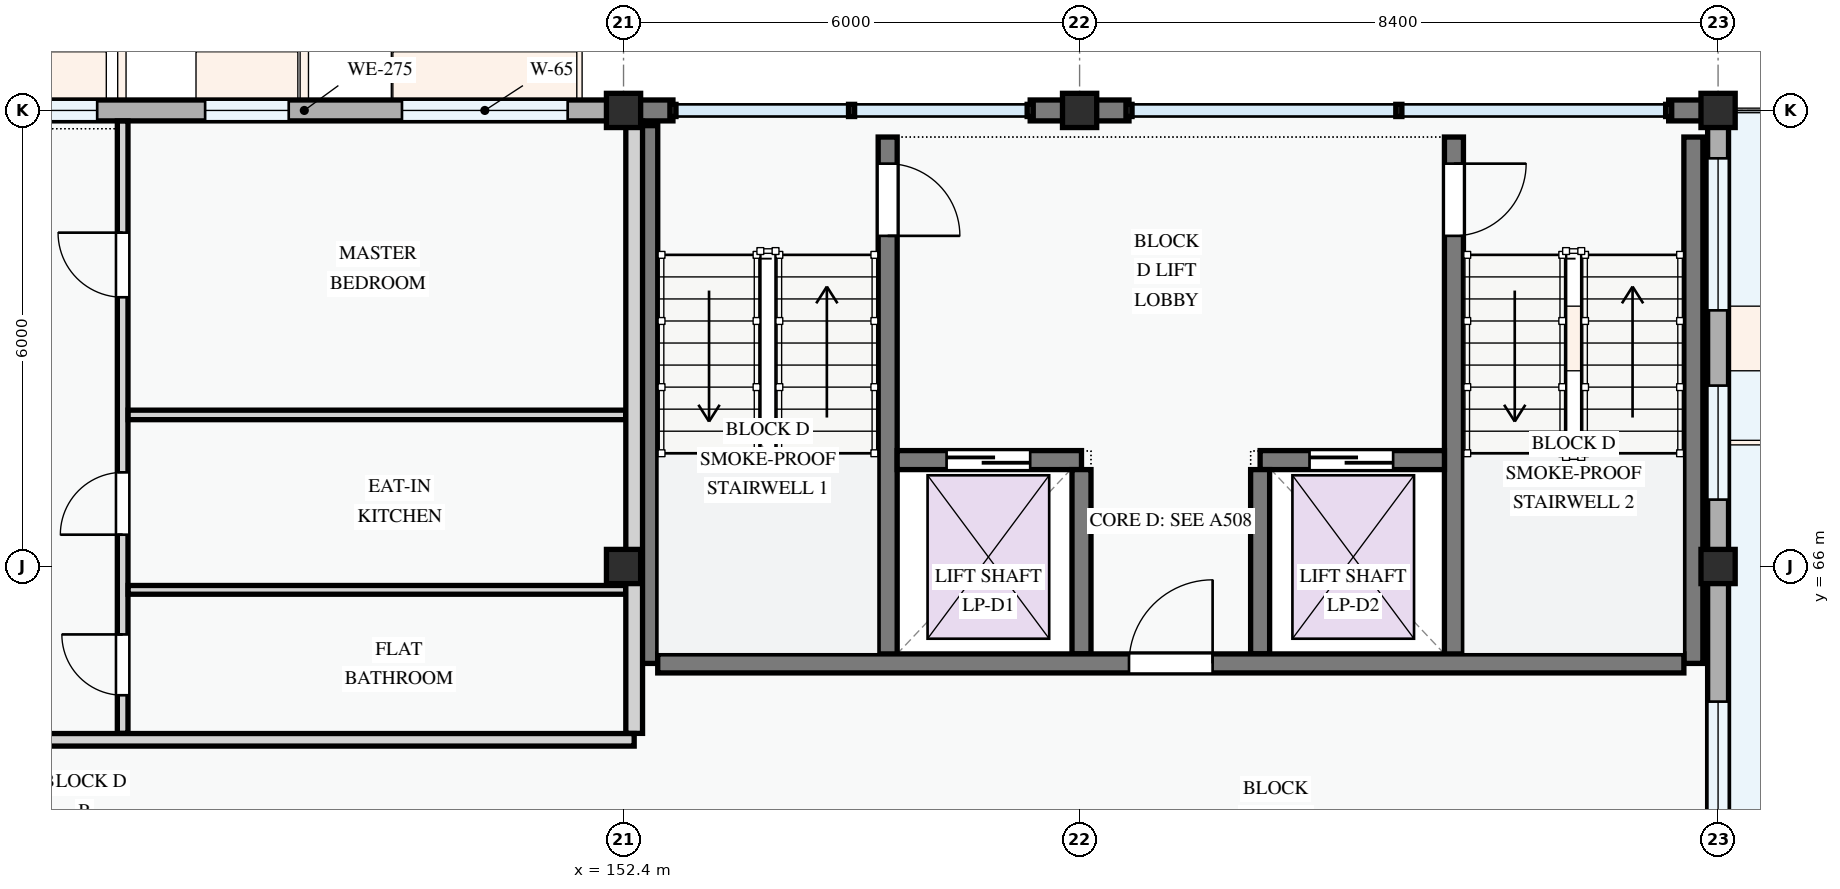
"""IFC4 building model, lengths in metres.
Left out: names, types, materials, properties, quantities, classifications, styles, units other than length and angle.
Written with IfcOpenShell. Run it as: python <this file> out.ifc"""

import sys

from ifc_helpers import new_model, si_unit, direction, frame, frame_2d, origin, origin_2d, place, context, subcontext, project, spatial, rectangle, extrude, element, fill, save


model = new_model("IFC4")
c1 = context("Model", 3, precision=1e-05, world=origin(), true_north=direction((0.0, 1.0)))
c2 = subcontext(c1, "Body", "Model", "MODEL_VIEW")
j1 = project(units=[si_unit("LENGTHUNIT", "METRE"), si_unit("PLANEANGLEUNIT", "RADIAN")], contexts=[c1])
p1 = place(None, origin())
s1 = spatial("IfcSite", under=j1, at=p1, CompositionType="ELEMENT")
p2 = place(p1, origin())
s2 = spatial("IfcBuilding", under=s1, at=p2, CompositionType="ELEMENT")
p3 = place(p2, frame((0.0, 0.0, 21.3)))
s3 = spatial("IfcBuildingStorey", under=s2, at=p3, CompositionType="ELEMENT", Elevation=21.3)
for number, where, z_axis, x_axis in (
    (1, (152.4, 66.0, 0.0), (0.0, 0.0, 1.0), (1.0, 0.0, 0.0)),
    (2, (152.4, 72.0, 0.0), (0.0, 0.0, 1.0), (1.0, 0.0, 0.0)),
    (3, (158.4, 72.0, 0.0), (0.0, 0.0, 1.0), (1.0, 0.0, 0.0)),
    (4, (166.8, 66.0, 0.0), (0.0, 0.0, 1.0), (1.0, 0.0, 0.0)),
    (5, (166.8, 72.0, 0.0), (0.0, 0.0, 1.0), (1.0, 0.0, 0.0)),
):
    element("IfcColumn", number, at=place(p3, frame(where, z_axis=z_axis, x_axis=x_axis)), inside=s3, PredefinedType="COLUMN", context=c2, shape_type="SweptSolid", body=[
        extrude(rectangle(XDim=0.45, YDim=0.45, at=origin_2d()), origin(), (0.0, 0.0, 1.0), 3.3),
    ])
p4 = place(p3, frame((152.4, 72.0, 0.0), z_axis=(0.0, 0.0, 1.0), x_axis=(-1.0, 0.0, 0.0)))
e6 = element("IfcWall", 6, at=p4, inside=s3, PredefinedType="STANDARD", context=c2, shape_type="SweptSolid", body=[
    extrude(rectangle(XDim=8.4, YDim=0.275, at=frame_2d((4.2, 0.0))), origin(), (0.0, 0.0, 1.0), 2.375),
])
p5 = place(p4, frame((0.735, 0.0, 0.78)))
e7 = element("IfcOpeningElement", 7, at=p5, cuts=e6, PredefinedType="OPENING", context=c2, shape_type="SweptSolid", body=[
    extrude(rectangle(XDim=2.18, YDim=1.48, at=frame_2d((1.09, 0.74))), frame((0.0, 0.147, 0.0), z_axis=(0.0, -1.0, 0.0), x_axis=(1.0, 0.0, 0.0)), (0.0, 0.0, 1.0), 0.295),
])
p6 = place(p4, frame((4.405, 0.0, 0.78)))
e8 = element("IfcOpeningElement", 8, at=p6, cuts=e6, PredefinedType="OPENING", context=c2, shape_type="SweptSolid", body=[
    extrude(rectangle(XDim=1.1, YDim=1.3, at=frame_2d((0.55, 0.65))), frame((0.0, 0.147, 0.0), z_axis=(0.0, -1.0, 0.0), x_axis=(1.0, 0.0, 0.0)), (0.0, 0.0, 1.0), 0.295),
])
p7 = place(p4, frame((6.925, 0.0, 0.78)))
e9 = element("IfcOpeningElement", 9, at=p7, cuts=e6, PredefinedType="OPENING", context=c2, shape_type="SweptSolid", body=[
    extrude(rectangle(XDim=0.95, YDim=1.15, at=frame_2d((0.475, 0.575))), frame((0.0, 0.147, 0.0), z_axis=(0.0, -1.0, 0.0), x_axis=(1.0, 0.0, 0.0)), (0.0, 0.0, 1.0), 0.295),
])
p8 = place(p3, frame((166.8, 57.6, 0.0), z_axis=(0.0, 0.0, 1.0), x_axis=(0.0, 1.0, 0.0)))
e10 = element("IfcWall", 10, at=p8, inside=s3, PredefinedType="STANDARD", context=c2, shape_type="SweptSolid", body=[
    extrude(rectangle(XDim=8.4, YDim=0.275, at=frame_2d((4.2, 0.0))), origin(), (0.0, 0.0, 1.0), 2.345),
])
p9 = place(p8, frame((1.485, 0.0, 0.78)))
e11 = element("IfcOpeningElement", 11, at=p9, cuts=e10, PredefinedType="OPENING", context=c2, shape_type="SweptSolid", body=[
    extrude(rectangle(XDim=1.42, YDim=1.38, at=frame_2d((0.71, 0.69))), frame((0.0, 0.147, 0.0), z_axis=(0.0, -1.0, 0.0), x_axis=(1.0, 0.0, 0.0)), (0.0, 0.0, 1.0), 0.295),
])
p10 = place(p8, frame((4.702, 0.0, 0.78)))
e12 = element("IfcOpeningElement", 12, at=p10, cuts=e10, PredefinedType="OPENING", context=c2, shape_type="SweptSolid", body=[
    extrude(rectangle(XDim=1.92, YDim=1.44, at=frame_2d((0.96, 0.72))), frame((0.0, 0.147, 0.0), z_axis=(0.0, -1.0, 0.0), x_axis=(1.0, 0.0, 0.0)), (0.0, 0.0, 1.0), 0.295),
])
p11 = place(p3, frame((166.8, 66.0, 0.0), z_axis=(0.0, 0.0, 1.0), x_axis=(0.0, 1.0, 0.0)))
e13 = element("IfcWall", 13, at=p11, inside=s3, PredefinedType="STANDARD", context=c2, shape_type="SweptSolid", body=[
    extrude(rectangle(XDim=6.0, YDim=0.275, at=frame_2d((3.0, 0.0))), origin(), (0.0, 0.0, 1.0), 2.445),
])
p12 = place(p11, frame((0.88, 0.0, 0.78)))
e14 = element("IfcOpeningElement", 14, at=p12, cuts=e13, PredefinedType="OPENING", context=c2, shape_type="SweptSolid", body=[
    extrude(rectangle(XDim=1.5, YDim=1.5, at=frame_2d((0.75, 0.75))), frame((0.0, 0.147, 0.0), z_axis=(0.0, -1.0, 0.0), x_axis=(1.0, 0.0, 0.0)), (0.0, 0.0, 1.0), 0.295),
])
p13 = place(p11, frame((3.37, 0.0, 0.78)))
e15 = element("IfcOpeningElement", 15, at=p13, cuts=e13, PredefinedType="OPENING", context=c2, shape_type="SweptSolid", body=[
    extrude(rectangle(XDim=2.0, YDim=1.5, at=frame_2d((1.0, 0.75))), frame((0.0, 0.147, 0.0), z_axis=(0.0, -1.0, 0.0), x_axis=(1.0, 0.0, 0.0)), (0.0, 0.0, 1.0), 0.295),
])
p14 = place(p3, frame((166.66, 72.0, 0.0), z_axis=(0.0, 0.0, 1.0), x_axis=(-1.0, 0.0, 0.0)))
e16 = element("IfcWall", 16, at=p14, inside=s3, PredefinedType="STANDARD", context=c2, shape_type="SweptSolid", body=[
    extrude(rectangle(XDim=0.51, YDim=0.275, at=frame_2d((0.255, 0.0))), origin(), (0.0, 0.0, 1.0), 3.04),
])
p15 = place(p3, frame((159.05, 72.0, 0.0), z_axis=(0.0, 0.0, 1.0), x_axis=(-1.0, 0.0, 0.0)))
e17 = element("IfcWall", 17, at=p15, inside=s3, PredefinedType="STANDARD", context=c2, shape_type="SweptSolid", body=[
    extrude(rectangle(XDim=0.65, YDim=0.275, at=frame_2d((0.325, 0.0))), origin(), (0.0, 0.0, 1.0), 3.04),
])
p16 = place(p3, frame((158.4, 72.0, 0.0), z_axis=(0.0, 0.0, 1.0), x_axis=(-1.0, 0.0, 0.0)))
e18 = element("IfcWall", 18, at=p16, inside=s3, PredefinedType="STANDARD", context=c2, shape_type="SweptSolid", body=[
    extrude(rectangle(XDim=0.65, YDim=0.275, at=frame_2d((0.325, 0.0))), origin(), (0.0, 0.0, 1.0), 3.04),
])
p17 = place(p3, frame((153.05, 72.0, 0.0), z_axis=(0.0, 0.0, 1.0), x_axis=(-1.0, 0.0, 0.0)))
e19 = element("IfcWall", 19, at=p17, inside=s3, PredefinedType="STANDARD", context=c2, shape_type="SweptSolid", body=[
    extrude(rectangle(XDim=0.65, YDim=0.275, at=frame_2d((0.325, 0.0))), origin(), (0.0, 0.0, 1.0), 3.04),
])
p18 = place(p3, frame((155.875, 71.65, 0.0), z_axis=(0.0, 0.0, 1.0), x_axis=(0.0, -1.0, 0.0)))
e20 = element("IfcWall", 20, at=p18, inside=s3, PredefinedType="SHEAR", context=c2, shape_type="SweptSolid", body=[
    extrude(rectangle(XDim=6.925, YDim=0.25, at=frame_2d((3.462, 0.0))), origin(), (0.0, 0.0, 1.0), 3.0),
])
p19 = place(p18, frame((0.35, 0.0, 0.0)))
e21 = element("IfcOpeningElement", 21, at=p19, cuts=e20, PredefinedType="OPENING", context=c2, shape_type="SweptSolid", body=[
    extrude(rectangle(XDim=0.95, YDim=2.1, at=frame_2d((0.475, 1.05))), frame((0.0, 0.135, 0.0), z_axis=(0.0, -1.0, 0.0), x_axis=(1.0, 0.0, 0.0)), (0.0, 0.0, 1.0), 0.27),
])
p20 = place(p3, frame((152.725, 71.8, 0.0), z_axis=(0.0, 0.0, 1.0), x_axis=(0.0, -1.0, 0.0)))
e22 = element("IfcWall", 22, at=p20, inside=s3, PredefinedType="SHEAR", context=c2, shape_type="SweptSolid", body=[
    extrude(rectangle(XDim=7.075, YDim=0.25, at=frame_2d((3.538, 0.0))), origin(), (0.0, 0.0, 1.0), 3.0),
])
p21 = place(p3, frame((166.475, 71.65, 0.0), z_axis=(0.0, 0.0, 1.0), x_axis=(0.0, -1.0, 0.0)))
e23 = element("IfcWall", 23, at=p21, inside=s3, PredefinedType="SHEAR", context=c2, shape_type="SweptSolid", body=[
    extrude(rectangle(XDim=6.925, YDim=0.25, at=frame_2d((3.462, 0.0))), origin(), (0.0, 0.0, 1.0), 3.0),
])
p22 = place(p3, frame((163.325, 71.65, 0.0), z_axis=(0.0, 0.0, 1.0), x_axis=(0.0, -1.0, 0.0)))
e24 = element("IfcWall", 24, at=p22, inside=s3, PredefinedType="SHEAR", context=c2, shape_type="SweptSolid", body=[
    extrude(rectangle(XDim=6.925, YDim=0.25, at=frame_2d((3.462, 0.0))), origin(), (0.0, 0.0, 1.0), 3.0),
])
p23 = place(p22, frame((0.35, 0.0, 0.0)))
e25 = element("IfcOpeningElement", 25, at=p23, cuts=e24, PredefinedType="OPENING", context=c2, shape_type="SweptSolid", body=[
    extrude(rectangle(XDim=0.95, YDim=2.1, at=frame_2d((0.475, 1.05))), frame((0.0, 0.135, 0.0), z_axis=(0.0, -1.0, 0.0), x_axis=(1.0, 0.0, 0.0)), (0.0, 0.0, 1.0), 0.27),
])
p24 = place(p3, frame((156.0, 67.4, 0.0), z_axis=(0.0, 0.0, 1.0), x_axis=(1.0, 0.0, 0.0)))
e26 = element("IfcWall", 26, at=p24, inside=s3, PredefinedType="SHEAR", context=c2, shape_type="SweptSolid", body=[
    extrude(rectangle(XDim=2.425, YDim=0.25, at=frame_2d((1.212, 0.0))), origin(), (0.0, 0.0, 1.0), 3.0),
])
p25 = place(p24, frame((0.65, 0.0, 0.0)))
e27 = element("IfcOpeningElement", 27, at=p25, cuts=e26, PredefinedType="OPENING", context=c2, shape_type="SweptSolid", body=[
    extrude(rectangle(XDim=1.1, YDim=2.15, at=frame_2d((0.55, 1.075))), frame((0.0, 0.135, 0.0), z_axis=(0.0, -1.0, 0.0), x_axis=(1.0, 0.0, 0.0)), (0.0, 0.0, 1.0), 0.27),
])
p26 = place(p3, frame((160.775, 67.4, 0.0), z_axis=(0.0, 0.0, 1.0), x_axis=(1.0, 0.0, 0.0)))
e28 = element("IfcWall", 28, at=p26, inside=s3, PredefinedType="SHEAR", context=c2, shape_type="SweptSolid", body=[
    extrude(rectangle(XDim=2.425, YDim=0.25, at=frame_2d((1.212, 0.0))), origin(), (0.0, 0.0, 1.0), 3.0),
])
p27 = place(p26, frame((0.65, 0.0, 0.0)))
e29 = element("IfcOpeningElement", 29, at=p27, cuts=e28, PredefinedType="OPENING", context=c2, shape_type="SweptSolid", body=[
    extrude(rectangle(XDim=1.1, YDim=2.15, at=frame_2d((0.55, 1.075))), frame((0.0, 0.135, 0.0), z_axis=(0.0, -1.0, 0.0), x_axis=(1.0, 0.0, 0.0)), (0.0, 0.0, 1.0), 0.27),
])
for number, where, z_axis, x_axis in (
    (30, (158.425, 67.275, 0.0), (0.0, 0.0, 1.0), (0.0, -1.0, 0.0)),
    (31, (160.775, 67.275, 0.0), (0.0, 0.0, 1.0), (0.0, -1.0, 0.0)),
):
    element("IfcWall", number, at=place(p3, frame(where, z_axis=z_axis, x_axis=x_axis)), inside=s3, PredefinedType="SHEAR", context=c2, shape_type="SweptSolid", body=[
        extrude(rectangle(XDim=2.425, YDim=0.25, at=frame_2d((1.212, 0.0))), origin(), (0.0, 0.0, 1.0), 3.0),
    ])
p28 = place(p3, frame((152.85, 64.725, 0.0), z_axis=(0.0, 0.0, 1.0), x_axis=(1.0, 0.0, 0.0)))
e32 = element("IfcWall", 32, at=p28, inside=s3, PredefinedType="SHEAR", context=c2, shape_type="SweptSolid", body=[
    extrude(rectangle(XDim=13.5, YDim=0.25, at=frame_2d((6.75, 0.0))), origin(), (0.0, 0.0, 1.0), 3.0),
])
p29 = place(p28, frame((6.2, 0.0, 0.0)))
e33 = element("IfcOpeningElement", 33, at=p29, cuts=e32, PredefinedType="OPENING", context=c2, shape_type="SweptSolid", body=[
    extrude(rectangle(XDim=1.1, YDim=2.15, at=frame_2d((0.55, 1.075))), frame((0.0, 0.135, 0.0), z_axis=(0.0, -1.0, 0.0), x_axis=(1.0, 0.0, 0.0)), (0.0, 0.0, 1.0), 0.27),
])
p30 = place(p3, frame((145.81, 63.804, 0.0), z_axis=(0.0, 0.0, 1.0), x_axis=(0.0, 1.0, 0.0)))
e34 = element("IfcWall", 34, at=p30, inside=s3, PredefinedType="PARTITIONING", context=c2, shape_type="SweptSolid", body=[
    extrude(rectangle(XDim=8.056, YDim=0.14, at=frame_2d((4.028, 0.0))), origin(), (0.0, 0.0, 1.0), 3.0),
])
p31 = place(p30, frame((0.502, 0.0, 0.0)))
e35 = element("IfcOpeningElement", 35, at=p31, cuts=e34, PredefinedType="OPENING", context=c2, shape_type="SweptSolid", body=[
    extrude(rectangle(XDim=0.8, YDim=2.1, at=frame_2d((0.4, 1.05))), frame((0.0, 0.08, 0.0), z_axis=(0.0, -1.0, 0.0), x_axis=(1.0, 0.0, 0.0)), (0.0, 0.0, 1.0), 0.16),
])
p32 = place(p30, frame((2.614, 0.0, 0.0)))
e36 = element("IfcOpeningElement", 36, at=p32, cuts=e34, PredefinedType="OPENING", context=c2, shape_type="SweptSolid", body=[
    extrude(rectangle(XDim=0.82, YDim=2.08, at=frame_2d((0.41, 1.04))), frame((0.0, 0.08, 0.0), z_axis=(0.0, -1.0, 0.0), x_axis=(1.0, 0.0, 0.0)), (0.0, 0.0, 1.0), 0.16),
])
p33 = place(p30, frame((5.738, 0.0, 0.0)))
e37 = element("IfcOpeningElement", 37, at=p33, cuts=e34, PredefinedType="OPENING", context=c2, shape_type="SweptSolid", body=[
    extrude(rectangle(XDim=0.85, YDim=2.1, at=frame_2d((0.425, 1.05))), frame((0.0, 0.08, 0.0), z_axis=(0.0, -1.0, 0.0), x_axis=(1.0, 0.0, 0.0)), (0.0, 0.0, 1.0), 0.16),
])
p34 = place(p3, frame((145.882, 67.994, 0.0), z_axis=(0.0, 0.0, 1.0), x_axis=(1.0, 0.0, 0.0)))
e38 = element("IfcWall", 38, at=p34, inside=s3, PredefinedType="PARTITIONING", context=c2, shape_type="SweptSolid", body=[
    extrude(rectangle(XDim=6.546, YDim=0.125, at=frame_2d((3.273, 0.0))), origin(), (0.0, 0.0, 1.0), 3.0),
])
p35 = place(p3, frame((145.882, 65.693, 0.0), z_axis=(0.0, 0.0, 1.0), x_axis=(1.0, 0.0, 0.0)))
e39 = element("IfcWall", 39, at=p35, inside=s3, PredefinedType="PARTITIONING", context=c2, shape_type="SweptSolid", body=[
    extrude(rectangle(XDim=6.546, YDim=0.115, at=frame_2d((3.273, 0.0))), origin(), (0.0, 0.0, 1.0), 2.375),
])
p36 = place(p3, frame((152.54, 63.804, 0.0), z_axis=(0.0, 0.0, 1.0), x_axis=(0.0, 1.0, 0.0)))
e40 = element("IfcWall", 40, at=p36, inside=s3, PredefinedType="PARTITIONING", context=c2, shape_type="SweptSolid", body=[
    extrude(rectangle(XDim=8.056, YDim=0.22, at=frame_2d((4.028, 0.0))), origin(), (0.0, 0.0, 1.0), 2.425),
])
p37 = place(p3, frame((138.139, 63.72, 0.0), z_axis=(0.0, 0.0, 1.0), x_axis=(1.0, 0.0, 0.0)))
e41 = element("IfcWall", 41, at=p37, inside=s3, PredefinedType="PARTITIONING", context=c2, shape_type="SweptSolid", body=[
    extrude(rectangle(XDim=14.401, YDim=0.165, at=frame_2d((7.2, 0.0))), origin(), (0.0, 0.0, 1.0), 3.0),
])
p38 = place(p37, frame((2.333, 0.0, 0.0)))
e42 = element("IfcOpeningElement", 42, at=p38, cuts=e41, PredefinedType="OPENING", context=c2, shape_type="SweptSolid", body=[
    extrude(rectangle(XDim=0.92, YDim=2.1, at=frame_2d((0.46, 1.05))), frame((0.0, 0.093, 0.0), z_axis=(0.0, -1.0, 0.0), x_axis=(1.0, 0.0, 0.0)), (0.0, 0.0, 1.0), 0.185),
])
p39 = place(p5, origin())
e43 = element("IfcWindow", 43, at=p39, inside=s3, PartitioningType="DOUBLE_PANEL_VERTICAL", PredefinedType="WINDOW", context=c2, shape_type="SweptSolid", body=[
    extrude(rectangle(XDim=2.18, YDim=1.48, at=frame_2d((1.09, 0.74))), frame((0.0, 0.03, 0.0), z_axis=(0.0, -1.0, 0.0), x_axis=(1.0, 0.0, 0.0)), (0.0, 0.0, 1.0), 0.06),
])
fill(e7, e43)
p40 = place(p6, origin())
e44 = element("IfcWindow", 44, at=p40, inside=s3, PartitioningType="SINGLE_PANEL", PredefinedType="WINDOW", context=c2, shape_type="SweptSolid", body=[
    extrude(rectangle(XDim=1.1, YDim=1.3, at=frame_2d((0.55, 0.65))), frame((0.0, 0.03, 0.0), z_axis=(0.0, -1.0, 0.0), x_axis=(1.0, 0.0, 0.0)), (0.0, 0.0, 1.0), 0.06),
])
fill(e8, e44)
p41 = place(p7, origin())
e45 = element("IfcWindow", 45, at=p41, inside=s3, PartitioningType="SINGLE_PANEL", PredefinedType="WINDOW", context=c2, shape_type="SweptSolid", body=[
    extrude(rectangle(XDim=0.95, YDim=1.15, at=frame_2d((0.475, 0.575))), frame((0.0, 0.03, 0.0), z_axis=(0.0, -1.0, 0.0), x_axis=(1.0, 0.0, 0.0)), (0.0, 0.0, 1.0), 0.06),
])
fill(e9, e45)
p42 = place(p10, origin())
e46 = element("IfcWindow", 46, at=p42, inside=s3, PartitioningType="DOUBLE_PANEL_VERTICAL", PredefinedType="WINDOW", context=c2, shape_type="SweptSolid", body=[
    extrude(rectangle(XDim=1.92, YDim=1.44, at=frame_2d((0.96, 0.72))), frame((0.0, 0.03, 0.0), z_axis=(0.0, -1.0, 0.0), x_axis=(1.0, 0.0, 0.0)), (0.0, 0.0, 1.0), 0.06),
])
fill(e12, e46)
p43 = place(p12, origin())
e47 = element("IfcWindow", 47, at=p43, inside=s3, PartitioningType="SINGLE_PANEL", PredefinedType="WINDOW", context=c2, shape_type="SweptSolid", body=[
    extrude(rectangle(XDim=1.5, YDim=1.5, at=frame_2d((0.75, 0.75))), frame((0.0, 0.03, 0.0), z_axis=(0.0, -1.0, 0.0), x_axis=(1.0, 0.0, 0.0)), (0.0, 0.0, 1.0), 0.06),
])
fill(e14, e47)
p44 = place(p13, origin())
e48 = element("IfcWindow", 48, at=p44, inside=s3, PartitioningType="DOUBLE_PANEL_VERTICAL", PredefinedType="WINDOW", context=c2, shape_type="SweptSolid", body=[
    extrude(rectangle(XDim=2.0, YDim=1.5, at=frame_2d((1.0, 0.75))), frame((0.0, 0.03, 0.0), z_axis=(0.0, -1.0, 0.0), x_axis=(1.0, 0.0, 0.0)), (0.0, 0.0, 1.0), 0.06),
])
fill(e15, e48)
p45 = place(p19, origin())
e49 = element("IfcDoor", 49, at=p45, inside=s3, OperationType="SINGLE_SWING_RIGHT", PredefinedType="DOOR", context=c2, shape_type="SweptSolid", body=[
    extrude(rectangle(XDim=0.95, YDim=2.1, at=frame_2d((0.475, 1.05))), frame((0.0, 0.025, 0.0), z_axis=(0.0, -1.0, 0.0), x_axis=(1.0, 0.0, 0.0)), (0.0, 0.0, 1.0), 0.05),
])
fill(e21, e49)
p46 = place(p23, origin())
e50 = element("IfcDoor", 50, at=p46, inside=s3, OperationType="SINGLE_SWING_LEFT", PredefinedType="DOOR", context=c2, shape_type="SweptSolid", body=[
    extrude(rectangle(XDim=0.95, YDim=2.1, at=frame_2d((0.475, 1.05))), frame((0.0, 0.025, 0.0), z_axis=(0.0, -1.0, 0.0), x_axis=(1.0, 0.0, 0.0)), (0.0, 0.0, 1.0), 0.05),
])
fill(e25, e50)
p47 = place(p25, origin())
e51 = element("IfcDoor", 51, at=p47, inside=s3, OperationType="SLIDING_TO_LEFT", PredefinedType="DOOR", context=c2, shape_type="SweptSolid", body=[
    extrude(rectangle(XDim=1.1, YDim=2.15, at=frame_2d((0.55, 1.075))), frame((0.0, 0.025, 0.0), z_axis=(0.0, -1.0, 0.0), x_axis=(1.0, 0.0, 0.0)), (0.0, 0.0, 1.0), 0.05),
])
fill(e27, e51)
p48 = place(p27, origin())
e52 = element("IfcDoor", 52, at=p48, inside=s3, OperationType="SLIDING_TO_LEFT", PredefinedType="DOOR", context=c2, shape_type="SweptSolid", body=[
    extrude(rectangle(XDim=1.1, YDim=2.15, at=frame_2d((0.55, 1.075))), frame((0.0, 0.025, 0.0), z_axis=(0.0, -1.0, 0.0), x_axis=(1.0, 0.0, 0.0)), (0.0, 0.0, 1.0), 0.05),
])
fill(e29, e52)
p49 = place(p29, origin())
e53 = element("IfcDoor", 53, at=p49, inside=s3, OperationType="SINGLE_SWING_RIGHT", PredefinedType="DOOR", context=c2, shape_type="SweptSolid", body=[
    extrude(rectangle(XDim=1.1, YDim=2.15, at=frame_2d((0.55, 1.075))), frame((0.0, 0.025, 0.0), z_axis=(0.0, -1.0, 0.0), x_axis=(1.0, 0.0, 0.0)), (0.0, 0.0, 1.0), 0.05),
])
fill(e33, e53)
p50 = place(p31, origin())
e54 = element("IfcDoor", 54, at=p50, inside=s3, OperationType="SINGLE_SWING_RIGHT", PredefinedType="DOOR", context=c2, shape_type="SweptSolid", body=[
    extrude(rectangle(XDim=0.8, YDim=2.1, at=frame_2d((0.4, 1.05))), frame((0.0, 0.025, 0.0), z_axis=(0.0, -1.0, 0.0), x_axis=(1.0, 0.0, 0.0)), (0.0, 0.0, 1.0), 0.05),
])
fill(e35, e54)
p51 = place(p32, origin())
e55 = element("IfcDoor", 55, at=p51, inside=s3, OperationType="SINGLE_SWING_LEFT", PredefinedType="DOOR", context=c2, shape_type="SweptSolid", body=[
    extrude(rectangle(XDim=0.82, YDim=2.08, at=frame_2d((0.41, 1.04))), frame((0.0, 0.025, 0.0), z_axis=(0.0, -1.0, 0.0), x_axis=(1.0, 0.0, 0.0)), (0.0, 0.0, 1.0), 0.05),
])
fill(e36, e55)
p52 = place(p33, origin())
e56 = element("IfcDoor", 56, at=p52, inside=s3, OperationType="SINGLE_SWING_RIGHT", PredefinedType="DOOR", context=c2, shape_type="SweptSolid", body=[
    extrude(rectangle(XDim=0.85, YDim=2.1, at=frame_2d((0.425, 1.05))), frame((0.0, 0.025, 0.0), z_axis=(0.0, -1.0, 0.0), x_axis=(1.0, 0.0, 0.0)), (0.0, 0.0, 1.0), 0.05),
])
fill(e37, e56)
save(model, sys.argv[1])
